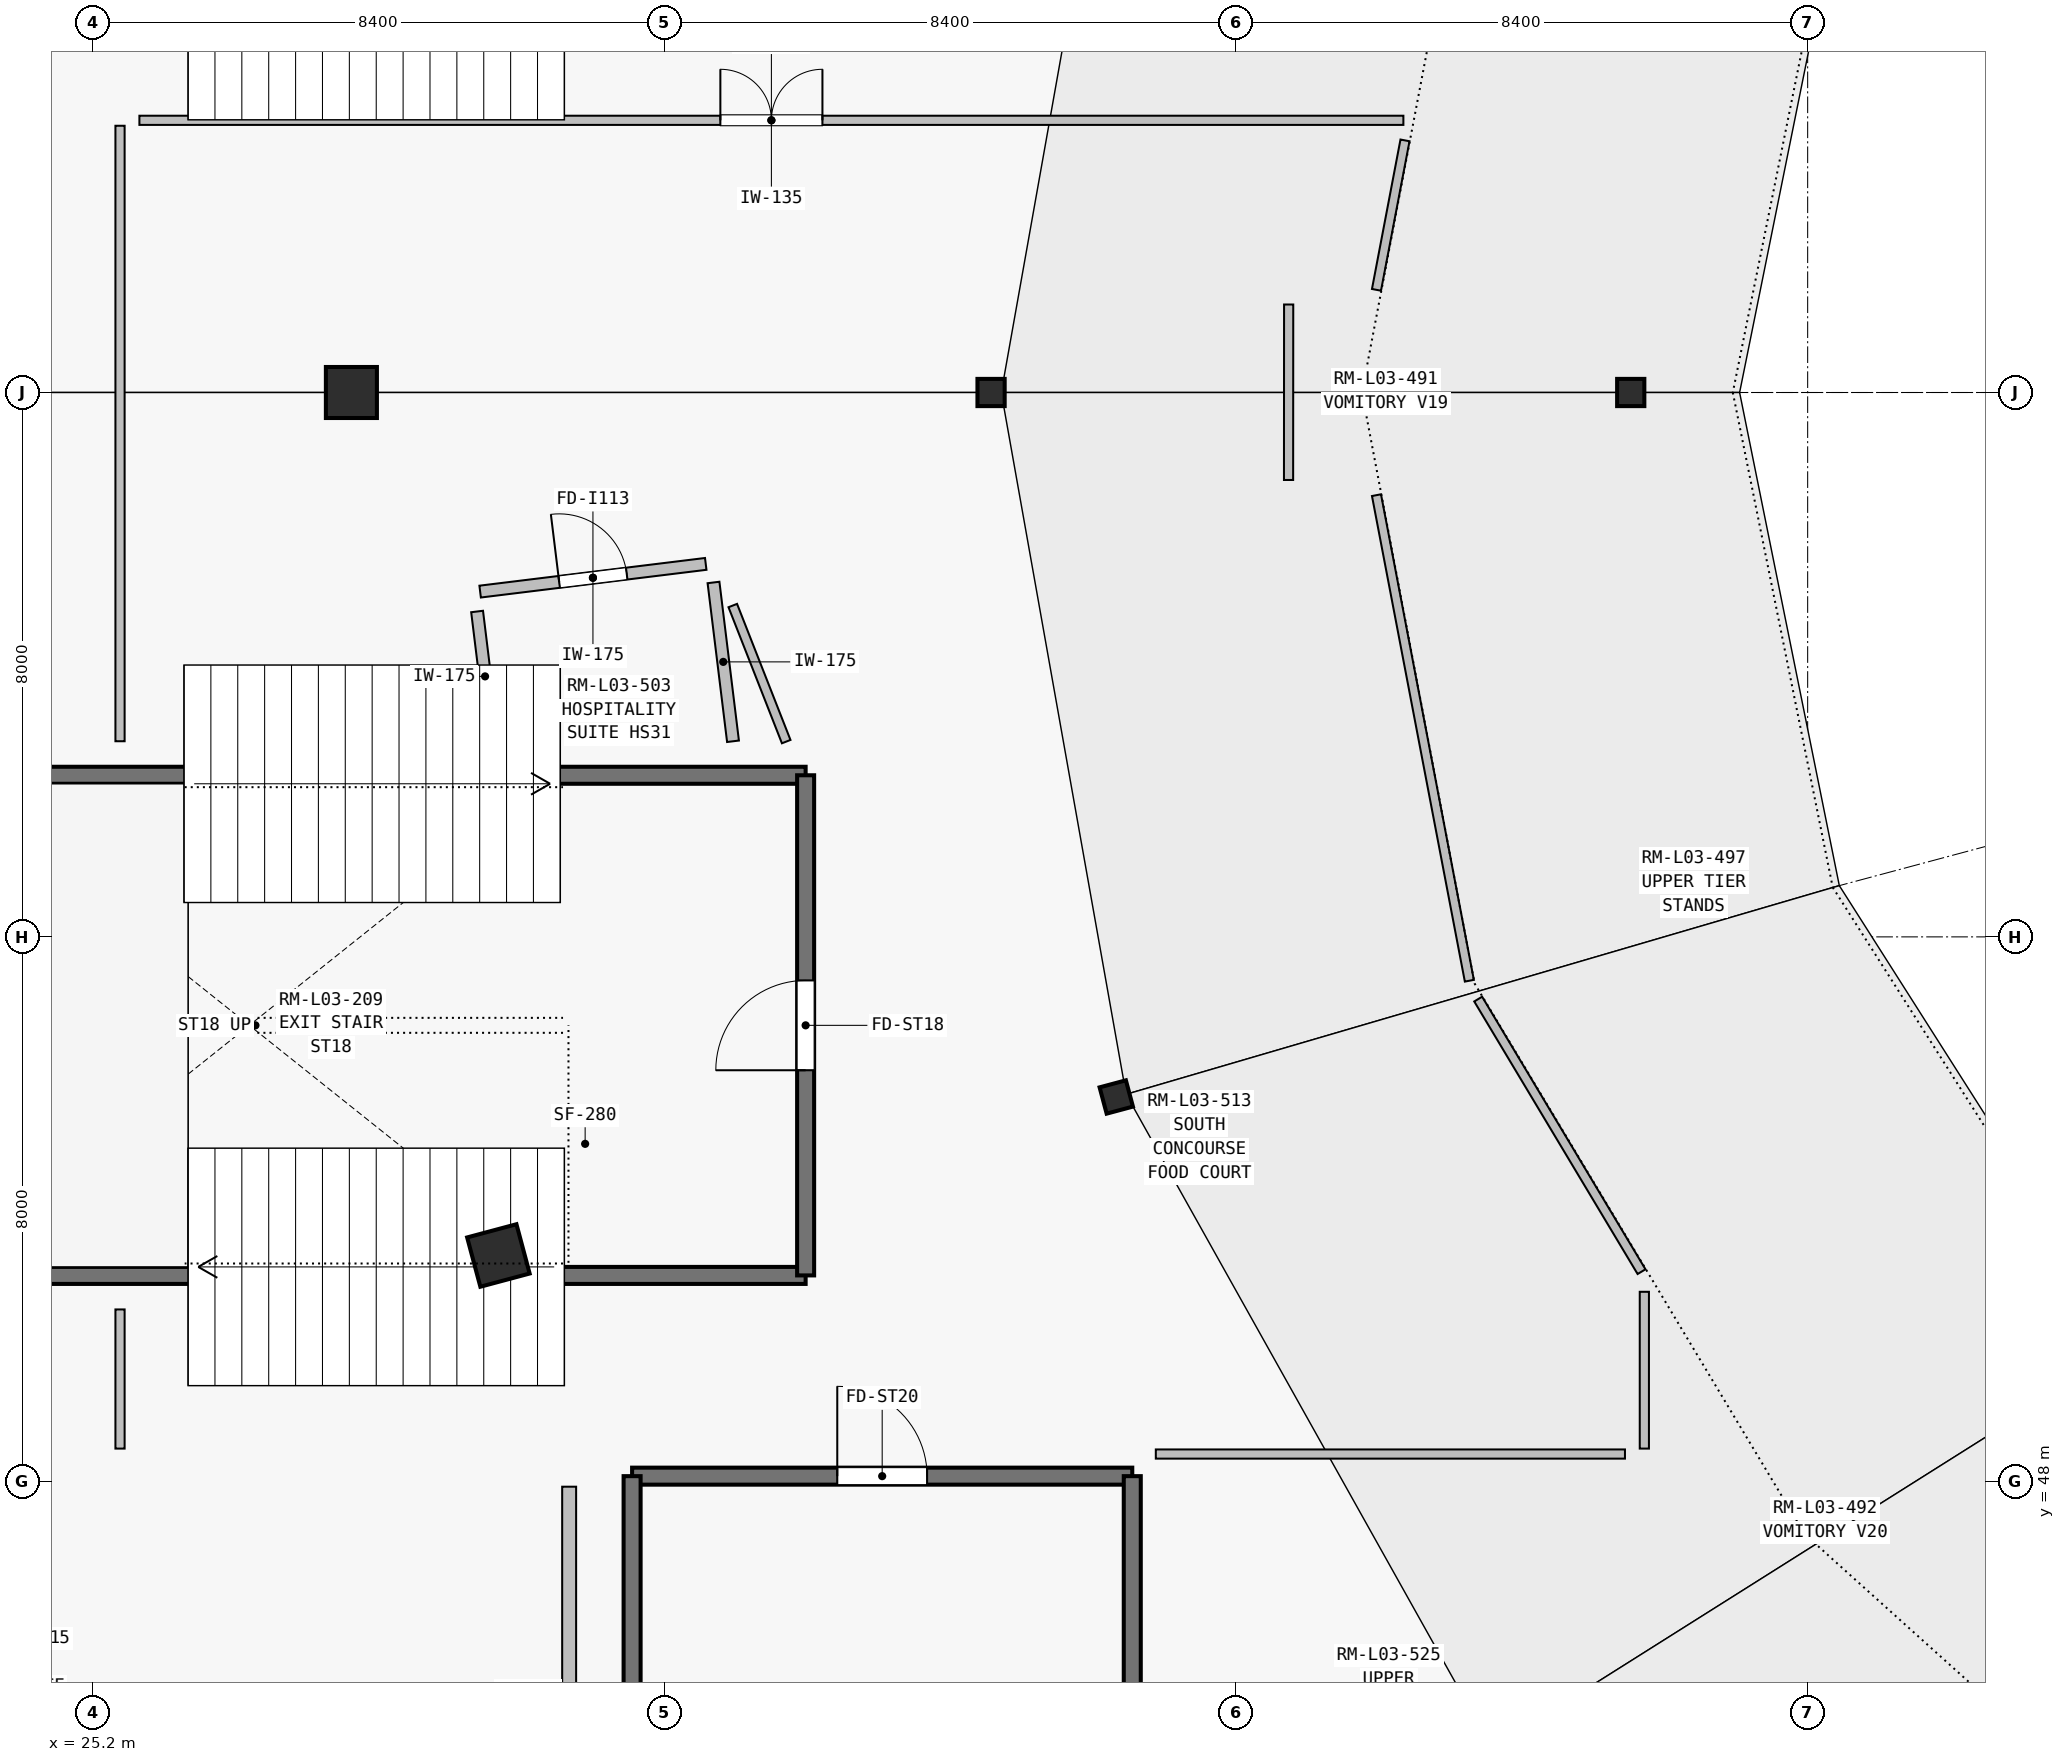
"""IFC4 building model, lengths in metres.
Left out: names, types, materials, properties, quantities, classifications, styles, units other than length and angle.
Written with IfcOpenShell. Run it as: python <this file> out.ifc"""

import sys

from ifc_helpers import new_model, si_unit, direction, frame, frame_2d, origin, origin_2d, place, context, subcontext, project, spatial, rectangle, i_section, extrude, element, fill, save


model = new_model("IFC4")
c1 = context("Model", 3, precision=1e-05, world=origin(), true_north=direction((0.0, 1.0)))
c2 = subcontext(c1, "Body", "Model", "MODEL_VIEW")
j1 = project(units=[si_unit("LENGTHUNIT", "METRE"), si_unit("PLANEANGLEUNIT", "RADIAN")], contexts=[c1])
p1 = place(None, origin())
s1 = spatial("IfcSite", under=j1, at=p1, CompositionType="ELEMENT")
p2 = place(p1, origin())
s2 = spatial("IfcBuilding", under=s1, at=p2, CompositionType="ELEMENT")
p3 = place(p2, frame((0.0, 0.0, 14.4)))
s3 = spatial("IfcBuildingStorey", under=s2, at=p3, CompositionType="ELEMENT", Elevation=14.4)
for number, where, z_axis, x_axis in (
    (1, (38.4, 64.0, 0.0), (0.0, 0.0, 1.0), (-1.0, 0.0, 0.0)),
    (2, (40.24, 53.647, 0.0), (0.0, 0.0, 1.0), (-0.966, -0.259, 0.0)),
):
    element("IfcColumn", number, at=place(p3, frame(where, z_axis=z_axis, x_axis=x_axis)), inside=s3, PredefinedType="COLUMN", context=c2, shape_type="SweptSolid", body=[
        extrude(i_section(OverallWidth=0.4, OverallDepth=0.4, WebThickness=0.016, FlangeThickness=0.028, at=origin_2d()), origin(), (0.0, 0.0, 1.0), 4.5),
    ])
for number, where, z_axis, x_axis in (
    (3, (29.0, 64.0, 0.0), (0.0, 0.0, 1.0), (-1.0, 0.0, 0.0)),
    (4, (31.16, 51.318, 0.0), (0.0, 0.0, 1.0), (-0.966, -0.259, 0.0)),
):
    element("IfcColumn", number, at=place(p3, frame(where, z_axis=z_axis, x_axis=x_axis)), inside=s3, PredefinedType="COLUMN", context=c2, shape_type="SweptSolid", body=[
        extrude(rectangle(XDim=0.75, YDim=0.75, at=origin_2d()), origin(), (0.0, 0.0, 1.0), 4.5),
    ])
p4 = place(p3, frame((47.8, 64.0, 0.0), z_axis=(0.0, 0.0, 1.0), x_axis=(-1.0, 0.0, 0.0)))
e5 = element("IfcColumn", 5, at=p4, inside=s3, PredefinedType="COLUMN", context=c2, shape_type="SweptSolid", body=[
    extrude(i_section(OverallWidth=0.4, OverallDepth=0.4, WebThickness=0.016, FlangeThickness=0.028, at=origin_2d()), origin(), (0.0, 0.0, 1.0), 4.5),
])
for number, where, z_axis, x_axis in (
    (6, (22.925, 51.025, 0.0), (0.0, 0.0, 1.0), (1.0, 0.0, 0.0)),
    (7, (22.925, 58.375, 0.0), (0.0, 0.0, 1.0), (1.0, 0.0, 0.0)),
):
    element("IfcWall", number, at=place(p3, frame(where, z_axis=z_axis, x_axis=x_axis)), inside=s3, PredefinedType="SHEAR", context=c2, shape_type="SweptSolid", body=[
        extrude(rectangle(XDim=12.75, YDim=0.25, at=frame_2d((6.375, 0.0))), origin(), (0.0, 0.0, 1.0), 4.5),
    ])
p5 = place(p3, frame((35.675, 51.025, 0.0), z_axis=(0.0, 0.0, 1.0), x_axis=(0.0, 1.0, 0.0)))
e8 = element("IfcWall", 8, at=p5, inside=s3, PredefinedType="SHEAR", context=c2, shape_type="SweptSolid", body=[
    extrude(rectangle(XDim=7.35, YDim=0.25, at=frame_2d((3.675, 0.0))), origin(), (0.0, 0.0, 1.0), 4.5),
])
p6 = place(p5, frame((3.015, 0.0, 0.0)))
e9 = element("IfcOpeningElement", 9, at=p6, cuts=e8, PredefinedType="OPENING", context=c2, shape_type="SweptSolid", body=[
    extrude(rectangle(XDim=1.32, YDim=2.2, at=frame_2d((0.66, 1.1))), frame((0.0, 0.135, 0.0), z_axis=(0.0, -1.0, 0.0), x_axis=(1.0, 0.0, 0.0)), (0.0, 0.0, 1.0), 0.27),
])
p7 = place(p3, frame((33.125, 48.075, 0.0), z_axis=(0.0, 0.0, 1.0), x_axis=(1.0, 0.0, 0.0)))
e10 = element("IfcWall", 10, at=p7, inside=s3, PredefinedType="SHEAR", context=c2, shape_type="SweptSolid", body=[
    extrude(rectangle(XDim=7.35, YDim=0.25, at=frame_2d((3.675, 0.0))), origin(), (0.0, 0.0, 1.0), 4.5),
])
p8 = place(p7, frame((3.015, 0.0, 0.0)))
e11 = element("IfcOpeningElement", 11, at=p8, cuts=e10, PredefinedType="OPENING", context=c2, shape_type="SweptSolid", body=[
    extrude(rectangle(XDim=1.32, YDim=2.2, at=frame_2d((0.66, 1.1))), frame((0.0, 0.135, 0.0), z_axis=(0.0, -1.0, 0.0), x_axis=(1.0, 0.0, 0.0)), (0.0, 0.0, 1.0), 0.27),
])
for number, where, z_axis, x_axis in (
    (12, (33.125, 35.325, 0.0), (0.0, 0.0, 1.0), (0.0, 1.0, 0.0)),
    (13, (40.475, 35.325, 0.0), (0.0, 0.0, 1.0), (0.0, 1.0, 0.0)),
):
    element("IfcWall", number, at=place(p3, frame(where, z_axis=z_axis, x_axis=x_axis)), inside=s3, PredefinedType="SHEAR", context=c2, shape_type="SweptSolid", body=[
        extrude(rectangle(XDim=12.75, YDim=0.25, at=frame_2d((6.375, 0.0))), origin(), (0.0, 0.0, 1.0), 4.5),
    ])
p9 = place(p3, frame((30.892, 61.074, 0.0), z_axis=(0.0, 0.0, 1.0), x_axis=(0.992547643848, 0.12185718974, 0.0)))
e14 = element("IfcWall", 14, at=p9, inside=s3, PredefinedType="PARTITIONING", context=c2, shape_type="SweptSolid", body=[
    extrude(rectangle(XDim=3.34, YDim=0.175, at=frame_2d((1.67, 0.0))), origin(), (0.0, 0.0, 1.0), 4.2),
])
p10 = place(p9, frame((1.17, 0.0, 0.0)))
e15 = element("IfcOpeningElement", 15, at=p10, cuts=e14, PredefinedType="OPENING", context=c2, shape_type="SweptSolid", body=[
    extrude(rectangle(XDim=1.0, YDim=2.2, at=frame_2d((0.5, 1.1))), frame((0.0, 0.097, 0.0), z_axis=(0.0, -1.0, 0.0), x_axis=(1.0, 0.0, 0.0)), (0.0, 0.0, 1.0), 0.195),
])
p11 = place(p3, frame((34.321, 61.208, 0.0), z_axis=(0.0, 0.0, 1.0), x_axis=(0.121900274378, -0.992542353306, 0.0)))
e16 = element("IfcWall", 16, at=p11, inside=s3, PredefinedType="PARTITIONING", context=c2, shape_type="SweptSolid", body=[
    extrude(rectangle(XDim=2.351, YDim=0.175, at=frame_2d((1.176, 0.0))), origin(), (0.0, 0.0, 1.0), 4.2),
])
p12 = place(p3, frame((31.081, 58.875, 0.0), z_axis=(0.0, 0.0, 1.0), x_axis=(-0.1217200163, 0.992564475302, 0.0)))
e17 = element("IfcWall", 17, at=p12, inside=s3, PredefinedType="PARTITIONING", context=c2, shape_type="SweptSolid", body=[
    extrude(rectangle(XDim=1.922, YDim=0.175, at=frame_2d((0.961, 0.0))), origin(), (0.0, 0.0, 1.0), 4.2),
])
p13 = place(p3, frame((25.6, 48.48, 0.0), z_axis=(0.0, 0.0, 1.0), x_axis=(0.0, 1.0, 0.0)))
e18 = element("IfcWall", 18, at=p13, inside=s3, PredefinedType="PARTITIONING", context=c2, shape_type="SweptSolid", body=[
    extrude(rectangle(XDim=2.045, YDim=0.135, at=frame_2d((1.022, 0.0))), origin(), (0.0, 0.0, 1.0), 4.2),
])
p14 = place(p3, frame((35.389, 58.869, 0.0), z_axis=(0.0, 0.0, 1.0), x_axis=(-0.365367553019, 0.930863336479, 0.0)))
e19 = element("IfcWall", 19, at=p14, inside=s3, PredefinedType="PARTITIONING", context=c2, shape_type="SweptSolid", body=[
    extrude(rectangle(XDim=2.148, YDim=0.135, at=frame_2d((1.074, 0.0))), origin(), (0.0, 0.0, 1.0), 4.2),
])
p15 = place(p3, frame((25.6, 58.875, 0.0), z_axis=(0.0, 0.0, 1.0), x_axis=(0.0, 1.0, 0.0)))
e20 = element("IfcWall", 20, at=p15, inside=s3, PredefinedType="PARTITIONING", context=c2, shape_type="SweptSolid", body=[
    extrude(rectangle(XDim=9.045, YDim=0.135, at=frame_2d((4.522, 0.0))), origin(), (0.0, 0.0, 1.0), 3.705),
])
p16 = place(p3, frame((25.885, 68.0, 0.0), z_axis=(0.0, 0.0, 1.0), x_axis=(1.0, 0.0, 0.0)))
e21 = element("IfcWall", 21, at=p16, inside=s3, PredefinedType="PARTITIONING", context=c2, shape_type="SweptSolid", body=[
    extrude(rectangle(XDim=18.574, YDim=0.135, at=frame_2d((9.287, 0.0))), origin(), (0.0, 0.0, 1.0), 2.943),
])
p17 = place(p16, frame((8.537, 0.0, 0.0)))
e22 = element("IfcOpeningElement", 22, at=p17, cuts=e21, PredefinedType="OPENING", context=c2, shape_type="SweptSolid", body=[
    extrude(rectangle(XDim=1.5, YDim=2.2, at=frame_2d((0.75, 1.1))), frame((0.0, 0.077, 0.0), z_axis=(0.0, -1.0, 0.0), x_axis=(1.0, 0.0, 0.0)), (0.0, 0.0, 1.0), 0.155),
])
p18 = place(p3, frame((44.483, 67.705, 0.0), z_axis=(0.0, 0.0, 1.0), x_axis=(-0.187458263923, -0.982272568734, 0.0)))
e23 = element("IfcWall", 23, at=p18, inside=s3, PredefinedType="PARTITIONING", context=c2, shape_type="SweptSolid", body=[
    extrude(rectangle(XDim=2.236, YDim=0.135, at=frame_2d((1.118, 0.0))), origin(), (0.0, 0.0, 1.0), 4.2),
])
p19 = place(p3, frame((42.773, 65.293, 0.0), z_axis=(0.0, 0.0, 1.0), x_axis=(-0.000662690378, -0.999999780421, 0.0)))
e24 = element("IfcWall", 24, at=p19, inside=s3, PredefinedType="PARTITIONING", context=c2, shape_type="SweptSolid", body=[
    extrude(rectangle(XDim=2.579, YDim=0.135, at=frame_2d((1.29, 0.0))), origin(), (0.0, 0.0, 1.0), 4.2),
])
p20 = place(p3, frame((44.064, 62.491, 0.0), z_axis=(0.0, 0.0, 1.0), x_axis=(0.187882600122, -0.982191492822, 0.0)))
e25 = element("IfcWall", 25, at=p20, inside=s3, PredefinedType="PARTITIONING", context=c2, shape_type="SweptSolid", body=[
    extrude(rectangle(XDim=7.265, YDim=0.135, at=frame_2d((3.633, 0.0))), origin(), (0.0, 0.0, 1.0), 4.2),
])
p21 = place(p3, frame((45.558, 55.086, 0.0), z_axis=(0.0, 0.0, 1.0), x_axis=(0.514065152824, -0.85775114028, 0.0)))
e26 = element("IfcWall", 26, at=p21, inside=s3, PredefinedType="PARTITIONING", context=c2, shape_type="SweptSolid", body=[
    extrude(rectangle(XDim=4.67, YDim=0.135, at=frame_2d((2.335, 0.0))), origin(), (0.0, 0.0, 1.0), 4.2),
])
p22 = place(p3, frame((48.0, 50.784, 0.0), z_axis=(0.0, 0.0, 1.0), x_axis=(0.0, -1.0, 0.0)))
e27 = element("IfcWall", 27, at=p22, inside=s3, PredefinedType="PARTITIONING", context=c2, shape_type="SweptSolid", body=[
    extrude(rectangle(XDim=2.304, YDim=0.135, at=frame_2d((1.152, 0.0))), origin(), (0.0, 0.0, 1.0), 4.2),
])
p23 = place(p3, frame((47.715, 48.4, 0.0), z_axis=(0.0, 0.0, 1.0), x_axis=(-1.0, 0.0, 0.0)))
e28 = element("IfcWall", 28, at=p23, inside=s3, PredefinedType="PARTITIONING", context=c2, shape_type="SweptSolid", body=[
    extrude(rectangle(XDim=6.894, YDim=0.135, at=frame_2d((3.447, 0.0))), origin(), (0.0, 0.0, 1.0), 2.943),
])
p24 = place(p3, frame((32.2, 47.92, 0.0), z_axis=(0.0, 0.0, 1.0), x_axis=(0.0, -1.0, 0.0)))
e29 = element("IfcWall", 29, at=p24, inside=s3, PredefinedType="SOLIDWALL", context=c2, shape_type="SweptSolid", body=[
    extrude(rectangle(XDim=11.84, YDim=0.205, at=frame_2d((5.92, 0.0))), origin(), (0.0, 0.0, 1.0), 3.715),
])
p25 = place(p6, origin())
e30 = element("IfcDoor", 30, at=p25, inside=s3, OperationType="SINGLE_SWING_LEFT", PredefinedType="DOOR", context=c2, shape_type="SweptSolid", body=[
    extrude(rectangle(XDim=1.32, YDim=2.2, at=frame_2d((0.66, 1.1))), frame((0.0, 0.025, 0.0), z_axis=(0.0, -1.0, 0.0), x_axis=(1.0, 0.0, 0.0)), (0.0, 0.0, 1.0), 0.05),
])
fill(e9, e30)
p26 = place(p8, origin())
e31 = element("IfcDoor", 31, at=p26, inside=s3, OperationType="SINGLE_SWING_LEFT", PredefinedType="DOOR", context=c2, shape_type="SweptSolid", body=[
    extrude(rectangle(XDim=1.32, YDim=2.2, at=frame_2d((0.66, 1.1))), frame((0.0, 0.025, 0.0), z_axis=(0.0, -1.0, 0.0), x_axis=(1.0, 0.0, 0.0)), (0.0, 0.0, 1.0), 0.05),
])
fill(e11, e31)
p27 = place(p10, origin())
e32 = element("IfcDoor", 32, at=p27, inside=s3, OperationType="SINGLE_SWING_LEFT", PredefinedType="DOOR", context=c2, shape_type="SweptSolid", body=[
    extrude(rectangle(XDim=1.0, YDim=2.2, at=frame_2d((0.5, 1.1))), frame((0.0, 0.025, 0.0), z_axis=(0.0, -1.0, 0.0), x_axis=(1.0, 0.0, 0.0)), (0.0, 0.0, 1.0), 0.05),
])
fill(e15, e32)
p28 = place(p17, origin())
e33 = element("IfcDoor", 33, at=p28, inside=s3, OperationType="DOUBLE_DOOR_SINGLE_SWING", PredefinedType="DOOR", context=c2, shape_type="SweptSolid", body=[
    extrude(rectangle(XDim=1.5, YDim=2.2, at=frame_2d((0.75, 1.1))), frame((0.0, 0.025, 0.0), z_axis=(0.0, -1.0, 0.0), x_axis=(1.0, 0.0, 0.0)), (0.0, 0.0, 1.0), 0.05),
])
fill(e22, e33)
save(model, sys.argv[1])
